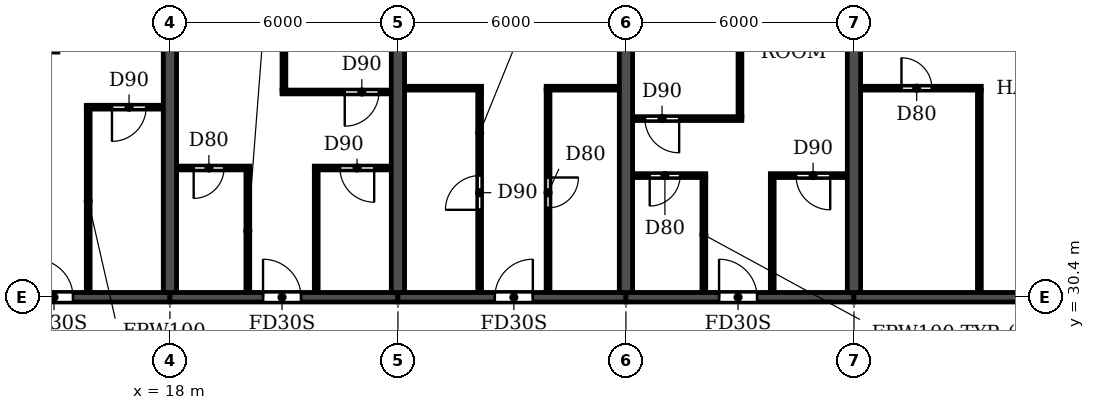
"""IFC4 building model, lengths in metres.
Left out: names, types, materials, properties, quantities, classifications, styles, units other than length and angle.
Written with IfcOpenShell. Run it as: python <this file> out.ifc"""

import sys

from ifc_helpers import new_model, si_unit, direction, frame, frame_2d, origin, place, context, subcontext, project, spatial, rectangle, extrude, element, fill, save


model = new_model("IFC4")
c1 = context("Model", 3, precision=1e-05, world=origin(), true_north=direction((0.0, 1.0)))
c2 = subcontext(c1, "Body", "Model", "MODEL_VIEW")
j1 = project(units=[si_unit("LENGTHUNIT", "METRE"), si_unit("PLANEANGLEUNIT", "RADIAN")], contexts=[c1])
p1 = place(None, origin())
s1 = spatial("IfcSite", under=j1, at=p1, CompositionType="ELEMENT")
p2 = place(p1, origin())
s2 = spatial("IfcBuilding", under=s1, at=p2, CompositionType="ELEMENT")
p3 = place(p2, frame((0.0, 0.0, 76.2)))
s3 = spatial("IfcBuildingStorey", under=s2, at=p3, CompositionType="ELEMENT", Elevation=76.2)
for number, where, z_axis, x_axis in (
    (1, (18.0, 30.525, 0.0), (0.0, 0.0, 1.0), (0.0, 1.0, 0.0)),
    (2, (24.0, 30.525, 0.0), (0.0, 0.0, 1.0), (0.0, 1.0, 0.0)),
    (3, (30.0, 30.525, 0.0), (0.0, 0.0, 1.0), (0.0, 1.0, 0.0)),
    (4, (36.0, 30.525, 0.0), (0.0, 0.0, 1.0), (0.0, 1.0, 0.0)),
):
    element("IfcWall", number, at=place(p3, frame(where, z_axis=z_axis, x_axis=x_axis)), inside=s3, PredefinedType="SHEAR", context=c2, shape_type="SweptSolid", body=[
        extrude(rectangle(XDim=12.875, YDim=0.35, at=frame_2d((6.438, 0.0))), origin(), (0.0, 0.0, 1.0), 3.06),
    ])
p4 = place(p3, frame((12.0, 30.4, 0.0), z_axis=(0.0, 0.0, 1.0), x_axis=(1.0, 0.0, 0.0)))
e5 = element("IfcWall", 5, at=p4, inside=s3, PredefinedType="SHEAR", context=c2, shape_type="SweptSolid", body=[
    extrude(rectangle(XDim=6.0, YDim=0.25, at=frame_2d((3.0, 0.0))), origin(), (0.0, 0.0, 1.0), 2.46),
])
p5 = place(p4, frame((2.45, 0.0, 0.0)))
e6 = element("IfcOpeningElement", 6, at=p5, cuts=e5, PredefinedType="OPENING", context=c2, shape_type="SweptSolid", body=[
    extrude(rectangle(XDim=1.0, YDim=2.1, at=frame_2d((0.5, 1.05))), frame((0.0, 0.135, 0.0), z_axis=(0.0, -1.0, 0.0), x_axis=(1.0, 0.0, 0.0)), (0.0, 0.0, 1.0), 0.27),
])
p6 = place(p3, frame((18.0, 30.4, 0.0), z_axis=(0.0, 0.0, 1.0), x_axis=(1.0, 0.0, 0.0)))
e7 = element("IfcWall", 7, at=p6, inside=s3, PredefinedType="SHEAR", context=c2, shape_type="SweptSolid", body=[
    extrude(rectangle(XDim=6.0, YDim=0.25, at=frame_2d((3.0, 0.0))), origin(), (0.0, 0.0, 1.0), 2.46),
])
p7 = place(p6, frame((2.45, 0.0, 0.0)))
e8 = element("IfcOpeningElement", 8, at=p7, cuts=e7, PredefinedType="OPENING", context=c2, shape_type="SweptSolid", body=[
    extrude(rectangle(XDim=1.0, YDim=2.1, at=frame_2d((0.5, 1.05))), frame((0.0, 0.135, 0.0), z_axis=(0.0, -1.0, 0.0), x_axis=(1.0, 0.0, 0.0)), (0.0, 0.0, 1.0), 0.27),
])
p8 = place(p3, frame((24.0, 30.4, 0.0), z_axis=(0.0, 0.0, 1.0), x_axis=(1.0, 0.0, 0.0)))
e9 = element("IfcWall", 9, at=p8, inside=s3, PredefinedType="SHEAR", context=c2, shape_type="SweptSolid", body=[
    extrude(rectangle(XDim=6.0, YDim=0.25, at=frame_2d((3.0, 0.0))), origin(), (0.0, 0.0, 1.0), 2.46),
])
p9 = place(p8, frame((2.55, 0.0, 0.0)))
e10 = element("IfcOpeningElement", 10, at=p9, cuts=e9, PredefinedType="OPENING", context=c2, shape_type="SweptSolid", body=[
    extrude(rectangle(XDim=1.0, YDim=2.1, at=frame_2d((0.5, 1.05))), frame((0.0, 0.135, 0.0), z_axis=(0.0, -1.0, 0.0), x_axis=(1.0, 0.0, 0.0)), (0.0, 0.0, 1.0), 0.27),
])
p10 = place(p3, frame((30.0, 30.4, 0.0), z_axis=(0.0, 0.0, 1.0), x_axis=(1.0, 0.0, 0.0)))
e11 = element("IfcWall", 11, at=p10, inside=s3, PredefinedType="SHEAR", context=c2, shape_type="SweptSolid", body=[
    extrude(rectangle(XDim=6.0, YDim=0.25, at=frame_2d((3.0, 0.0))), origin(), (0.0, 0.0, 1.0), 2.46),
])
p11 = place(p10, frame((2.45, 0.0, 0.0)))
e12 = element("IfcOpeningElement", 12, at=p11, cuts=e11, PredefinedType="OPENING", context=c2, shape_type="SweptSolid", body=[
    extrude(rectangle(XDim=1.0, YDim=2.1, at=frame_2d((0.5, 1.05))), frame((0.0, 0.135, 0.0), z_axis=(0.0, -1.0, 0.0), x_axis=(1.0, 0.0, 0.0)), (0.0, 0.0, 1.0), 0.27),
])
p12 = place(p3, frame((36.0, 30.4, 0.0), z_axis=(0.0, 0.0, 1.0), x_axis=(1.0, 0.0, 0.0)))
e13 = element("IfcWall", 13, at=p12, inside=s3, PredefinedType="SHEAR", context=c2, shape_type="SweptSolid", body=[
    extrude(rectangle(XDim=6.0, YDim=0.25, at=frame_2d((3.0, 0.0))), origin(), (0.0, 0.0, 1.0), 2.46),
])
p13 = place(p3, frame((30.185, 33.6, 0.0), z_axis=(0.0, 0.0, 1.0), x_axis=(1.0, 0.0, 0.0)))
e14 = element("IfcWall", 14, at=p13, inside=s3, PredefinedType="PARTITIONING", context=c2, shape_type="SweptSolid", body=[
    extrude(rectangle(XDim=1.915, YDim=0.1, at=frame_2d((0.958, 0.0))), origin(), (0.0, 0.0, 1.0), 3.06),
])
p14 = place(p13, frame((0.44, 0.0, 0.0)))
e15 = element("IfcOpeningElement", 15, at=p14, cuts=e14, PredefinedType="OPENING", context=c2, shape_type="SweptSolid", body=[
    extrude(rectangle(XDim=0.8, YDim=2.1, at=frame_2d((0.4, 1.05))), frame((0.0, 0.06, 0.0), z_axis=(0.0, -1.0, 0.0), x_axis=(1.0, 0.0, 0.0)), (0.0, 0.0, 1.0), 0.12),
])
p15 = place(p3, frame((33.8, 33.6, 0.0), z_axis=(0.0, 0.0, 1.0), x_axis=(1.0, 0.0, 0.0)))
e16 = element("IfcWall", 16, at=p15, inside=s3, PredefinedType="PARTITIONING", context=c2, shape_type="SweptSolid", body=[
    extrude(rectangle(XDim=2.015, YDim=0.1, at=frame_2d((1.007, 0.0))), origin(), (0.0, 0.0, 1.0), 3.06),
])
p16 = place(p15, frame((0.675, 0.0, 0.0)))
e17 = element("IfcOpeningElement", 17, at=p16, cuts=e16, PredefinedType="OPENING", context=c2, shape_type="SweptSolid", body=[
    extrude(rectangle(XDim=0.9, YDim=2.1, at=frame_2d((0.45, 1.05))), frame((0.0, 0.06, 0.0), z_axis=(0.0, -1.0, 0.0), x_axis=(1.0, 0.0, 0.0)), (0.0, 0.0, 1.0), 0.12),
])
p17 = place(p3, frame((18.185, 33.8, 0.0), z_axis=(0.0, 0.0, 1.0), x_axis=(1.0, 0.0, 0.0)))
e18 = element("IfcWall", 18, at=p17, inside=s3, PredefinedType="PARTITIONING", context=c2, shape_type="SweptSolid", body=[
    extrude(rectangle(XDim=1.915, YDim=0.1, at=frame_2d((0.958, 0.0))), origin(), (0.0, 0.0, 1.0), 3.06),
])
p18 = place(p17, frame((0.44, 0.0, 0.0)))
e19 = element("IfcOpeningElement", 19, at=p18, cuts=e18, PredefinedType="OPENING", context=c2, shape_type="SweptSolid", body=[
    extrude(rectangle(XDim=0.8, YDim=2.1, at=frame_2d((0.4, 1.05))), frame((0.0, 0.06, 0.0), z_axis=(0.0, -1.0, 0.0), x_axis=(1.0, 0.0, 0.0)), (0.0, 0.0, 1.0), 0.12),
])
p19 = place(p3, frame((21.8, 33.8, 0.0), z_axis=(0.0, 0.0, 1.0), x_axis=(1.0, 0.0, 0.0)))
e20 = element("IfcWall", 20, at=p19, inside=s3, PredefinedType="PARTITIONING", context=c2, shape_type="SweptSolid", body=[
    extrude(rectangle(XDim=2.015, YDim=0.1, at=frame_2d((1.007, 0.0))), origin(), (0.0, 0.0, 1.0), 3.06),
])
p20 = place(p19, frame((0.675, 0.0, 0.0)))
e21 = element("IfcOpeningElement", 21, at=p20, cuts=e20, PredefinedType="OPENING", context=c2, shape_type="SweptSolid", body=[
    extrude(rectangle(XDim=0.9, YDim=2.1, at=frame_2d((0.45, 1.05))), frame((0.0, 0.06, 0.0), z_axis=(0.0, -1.0, 0.0), x_axis=(1.0, 0.0, 0.0)), (0.0, 0.0, 1.0), 0.12),
])
p21 = place(p3, frame((30.185, 35.1, 0.0), z_axis=(0.0, 0.0, 1.0), x_axis=(1.0, 0.0, 0.0)))
e22 = element("IfcWall", 22, at=p21, inside=s3, PredefinedType="PARTITIONING", context=c2, shape_type="SweptSolid", body=[
    extrude(rectangle(XDim=2.865, YDim=0.1, at=frame_2d((1.433, 0.0))), origin(), (0.0, 0.0, 1.0), 3.06),
])
p22 = place(p21, frame((0.315, 0.0, 0.0)))
e23 = element("IfcOpeningElement", 23, at=p22, cuts=e22, PredefinedType="OPENING", context=c2, shape_type="SweptSolid", body=[
    extrude(rectangle(XDim=0.9, YDim=2.1, at=frame_2d((0.45, 1.05))), frame((0.0, 0.06, 0.0), z_axis=(0.0, -1.0, 0.0), x_axis=(1.0, 0.0, 0.0)), (0.0, 0.0, 1.0), 0.12),
])
p23 = place(p3, frame((15.8, 35.4, 0.0), z_axis=(0.0, 0.0, 1.0), x_axis=(1.0, 0.0, 0.0)))
e24 = element("IfcWall", 24, at=p23, inside=s3, PredefinedType="PARTITIONING", context=c2, shape_type="SweptSolid", body=[
    extrude(rectangle(XDim=2.015, YDim=0.1, at=frame_2d((1.007, 0.0))), origin(), (0.0, 0.0, 1.0), 3.06),
])
p24 = place(p23, frame((0.675, 0.0, 0.0)))
e25 = element("IfcOpeningElement", 25, at=p24, cuts=e24, PredefinedType="OPENING", context=c2, shape_type="SweptSolid", body=[
    extrude(rectangle(XDim=0.9, YDim=2.1, at=frame_2d((0.45, 1.05))), frame((0.0, 0.06, 0.0), z_axis=(0.0, -1.0, 0.0), x_axis=(1.0, 0.0, 0.0)), (0.0, 0.0, 1.0), 0.12),
])
p25 = place(p3, frame((20.95, 35.8, 0.0), z_axis=(0.0, 0.0, 1.0), x_axis=(1.0, 0.0, 0.0)))
e26 = element("IfcWall", 26, at=p25, inside=s3, PredefinedType="PARTITIONING", context=c2, shape_type="SweptSolid", body=[
    extrude(rectangle(XDim=2.865, YDim=0.1, at=frame_2d((1.433, 0.0))), origin(), (0.0, 0.0, 1.0), 3.06),
])
p26 = place(p25, frame((1.65, 0.0, 0.0)))
e27 = element("IfcOpeningElement", 27, at=p26, cuts=e26, PredefinedType="OPENING", context=c2, shape_type="SweptSolid", body=[
    extrude(rectangle(XDim=0.9, YDim=2.1, at=frame_2d((0.45, 1.05))), frame((0.0, 0.06, 0.0), z_axis=(0.0, -1.0, 0.0), x_axis=(1.0, 0.0, 0.0)), (0.0, 0.0, 1.0), 0.12),
])
p27 = place(p3, frame((24.185, 35.9, 0.0), z_axis=(0.0, 0.0, 1.0), x_axis=(1.0, 0.0, 0.0)))
e28 = element("IfcWall", 28, at=p27, inside=s3, PredefinedType="PARTITIONING", context=c2, shape_type="SweptSolid", body=[
    extrude(rectangle(XDim=2.015, YDim=0.1, at=frame_2d((1.007, 0.0))), origin(), (0.0, 0.0, 1.0), 3.06),
])
p28 = place(p3, frame((27.9, 35.9, 0.0), z_axis=(0.0, 0.0, 1.0), x_axis=(1.0, 0.0, 0.0)))
e29 = element("IfcWall", 29, at=p28, inside=s3, PredefinedType="PARTITIONING", context=c2, shape_type="SweptSolid", body=[
    extrude(rectangle(XDim=1.915, YDim=0.1, at=frame_2d((0.958, 0.0))), origin(), (0.0, 0.0, 1.0), 3.06),
])
p29 = place(p3, frame((36.185, 35.9, 0.0), z_axis=(0.0, 0.0, 1.0), x_axis=(1.0, 0.0, 0.0)))
e30 = element("IfcWall", 30, at=p29, inside=s3, PredefinedType="PARTITIONING", context=c2, shape_type="SweptSolid", body=[
    extrude(rectangle(XDim=3.165, YDim=0.1, at=frame_2d((1.583, 0.0))), origin(), (0.0, 0.0, 1.0), 3.06),
])
p30 = place(p29, frame((1.065, 0.0, 0.0)))
e31 = element("IfcOpeningElement", 31, at=p30, cuts=e30, PredefinedType="OPENING", context=c2, shape_type="SweptSolid", body=[
    extrude(rectangle(XDim=0.8, YDim=2.1, at=frame_2d((0.4, 1.05))), frame((0.0, 0.06, 0.0), z_axis=(0.0, -1.0, 0.0), x_axis=(1.0, 0.0, 0.0)), (0.0, 0.0, 1.0), 0.12),
])
p31 = place(p3, frame((12.185, 36.9, 0.0), z_axis=(0.0, 0.0, 1.0), x_axis=(1.0, 0.0, 0.0)))
e32 = element("IfcWall", 32, at=p31, inside=s3, PredefinedType="PARTITIONING", context=c2, shape_type="SweptSolid", body=[
    extrude(rectangle(XDim=2.865, YDim=0.1, at=frame_2d((1.433, 0.0))), origin(), (0.0, 0.0, 1.0), 3.06),
])
p32 = place(p31, frame((1.415, 0.0, 0.0)))
e33 = element("IfcOpeningElement", 33, at=p32, cuts=e32, PredefinedType="OPENING", context=c2, shape_type="SweptSolid", body=[
    extrude(rectangle(XDim=0.9, YDim=2.1, at=frame_2d((0.45, 1.05))), frame((0.0, 0.06, 0.0), z_axis=(0.0, -1.0, 0.0), x_axis=(1.0, 0.0, 0.0)), (0.0, 0.0, 1.0), 0.12),
])
p33 = place(p3, frame((15.85, 30.535, 0.0), z_axis=(0.0, 0.0, 1.0), x_axis=(0.0, 1.0, 0.0)))
e34 = element("IfcWall", 34, at=p33, inside=s3, PredefinedType="PARTITIONING", context=c2, shape_type="SweptSolid", body=[
    extrude(rectangle(XDim=4.815, YDim=0.1, at=frame_2d((2.408, 0.0))), origin(), (0.0, 0.0, 1.0), 3.06),
])
p34 = place(p3, frame((20.05, 30.535, 0.0), z_axis=(0.0, 0.0, 1.0), x_axis=(0.0, 1.0, 0.0)))
e35 = element("IfcWall", 35, at=p34, inside=s3, PredefinedType="PARTITIONING", context=c2, shape_type="SweptSolid", body=[
    extrude(rectangle(XDim=3.215, YDim=0.1, at=frame_2d((1.607, 0.0))), origin(), (0.0, 0.0, 1.0), 3.06),
])
p35 = place(p3, frame((21.0, 35.85, 0.0), z_axis=(0.0, 0.0, 1.0), x_axis=(0.0, 1.0, 0.0)))
e36 = element("IfcWall", 36, at=p35, inside=s3, PredefinedType="PARTITIONING", context=c2, shape_type="SweptSolid", body=[
    extrude(rectangle(XDim=7.69, YDim=0.1, at=frame_2d((3.845, 0.0))), origin(), (0.0, 0.0, 1.0), 3.06),
])
p36 = place(p3, frame((21.85, 30.535, 0.0), z_axis=(0.0, 0.0, 1.0), x_axis=(0.0, 1.0, 0.0)))
e37 = element("IfcWall", 37, at=p36, inside=s3, PredefinedType="PARTITIONING", context=c2, shape_type="SweptSolid", body=[
    extrude(rectangle(XDim=3.215, YDim=0.1, at=frame_2d((1.607, 0.0))), origin(), (0.0, 0.0, 1.0), 3.06),
])
p37 = place(p3, frame((26.15, 30.535, 0.0), z_axis=(0.0, 0.0, 1.0), x_axis=(0.0, 1.0, 0.0)))
e38 = element("IfcWall", 38, at=p37, inside=s3, PredefinedType="PARTITIONING", context=c2, shape_type="SweptSolid", body=[
    extrude(rectangle(XDim=5.315, YDim=0.1, at=frame_2d((2.658, 0.0))), origin(), (0.0, 0.0, 1.0), 3.06),
])
p38 = place(p37, frame((2.165, 0.0, 0.0)))
e39 = element("IfcOpeningElement", 39, at=p38, cuts=e38, PredefinedType="OPENING", context=c2, shape_type="SweptSolid", body=[
    extrude(rectangle(XDim=0.9, YDim=2.1, at=frame_2d((0.45, 1.05))), frame((0.0, 0.06, 0.0), z_axis=(0.0, -1.0, 0.0), x_axis=(1.0, 0.0, 0.0)), (0.0, 0.0, 1.0), 0.12),
])
p39 = place(p3, frame((27.95, 30.535, 0.0), z_axis=(0.0, 0.0, 1.0), x_axis=(0.0, 1.0, 0.0)))
e40 = element("IfcWall", 40, at=p39, inside=s3, PredefinedType="PARTITIONING", context=c2, shape_type="SweptSolid", body=[
    extrude(rectangle(XDim=5.315, YDim=0.1, at=frame_2d((2.658, 0.0))), origin(), (0.0, 0.0, 1.0), 3.06),
])
p40 = place(p39, frame((2.215, 0.0, 0.0)))
e41 = element("IfcOpeningElement", 41, at=p40, cuts=e40, PredefinedType="OPENING", context=c2, shape_type="SweptSolid", body=[
    extrude(rectangle(XDim=0.8, YDim=2.1, at=frame_2d((0.4, 1.05))), frame((0.0, 0.06, 0.0), z_axis=(0.0, -1.0, 0.0), x_axis=(1.0, 0.0, 0.0)), (0.0, 0.0, 1.0), 0.12),
])
p41 = place(p3, frame((32.05, 30.535, 0.0), z_axis=(0.0, 0.0, 1.0), x_axis=(0.0, 1.0, 0.0)))
e42 = element("IfcWall", 42, at=p41, inside=s3, PredefinedType="PARTITIONING", context=c2, shape_type="SweptSolid", body=[
    extrude(rectangle(XDim=3.015, YDim=0.1, at=frame_2d((1.508, 0.0))), origin(), (0.0, 0.0, 1.0), 3.06),
])
p42 = place(p3, frame((33.0, 35.15, 0.0), z_axis=(0.0, 0.0, 1.0), x_axis=(0.0, 1.0, 0.0)))
e43 = element("IfcWall", 43, at=p42, inside=s3, PredefinedType="PARTITIONING", context=c2, shape_type="SweptSolid", body=[
    extrude(rectangle(XDim=8.39, YDim=0.1, at=frame_2d((4.195, 0.0))), origin(), (0.0, 0.0, 1.0), 3.06),
])
p43 = place(p3, frame((33.85, 30.535, 0.0), z_axis=(0.0, 0.0, 1.0), x_axis=(0.0, 1.0, 0.0)))
e44 = element("IfcWall", 44, at=p43, inside=s3, PredefinedType="PARTITIONING", context=c2, shape_type="SweptSolid", body=[
    extrude(rectangle(XDim=3.015, YDim=0.1, at=frame_2d((1.508, 0.0))), origin(), (0.0, 0.0, 1.0), 3.06),
])
p44 = place(p3, frame((39.3, 30.535, 0.0), z_axis=(0.0, 0.0, 1.0), x_axis=(0.0, 1.0, 0.0)))
e45 = element("IfcWall", 45, at=p44, inside=s3, PredefinedType="PARTITIONING", context=c2, shape_type="SweptSolid", body=[
    extrude(rectangle(XDim=5.315, YDim=0.1, at=frame_2d((2.658, 0.0))), origin(), (0.0, 0.0, 1.0), 3.06),
])
p45 = place(p5, origin())
e46 = element("IfcDoor", 46, at=p45, inside=s3, OperationType="SINGLE_SWING_LEFT", PredefinedType="DOOR", context=c2, shape_type="SweptSolid", body=[
    extrude(rectangle(XDim=1.0, YDim=2.1, at=frame_2d((0.5, 1.05))), frame((0.0, 0.025, 0.0), z_axis=(0.0, -1.0, 0.0), x_axis=(1.0, 0.0, 0.0)), (0.0, 0.0, 1.0), 0.05),
])
fill(e6, e46)
p46 = place(p24, frame((0.9, 0.0, 0.0), z_axis=(0.0, 0.0, 1.0), x_axis=(-1.0, 0.0, 0.0)))
e47 = element("IfcDoor", 47, at=p46, inside=s3, OperationType="SINGLE_SWING_RIGHT", PredefinedType="DOOR", context=c2, shape_type="SweptSolid", body=[
    extrude(rectangle(XDim=0.9, YDim=2.1, at=frame_2d((0.45, 1.05))), frame((0.0, 0.025, 0.0), z_axis=(0.0, -1.0, 0.0), x_axis=(1.0, 0.0, 0.0)), (0.0, 0.0, 1.0), 0.05),
])
fill(e25, e47)
p47 = place(p18, frame((0.8, 0.0, 0.0), z_axis=(0.0, 0.0, 1.0), x_axis=(-1.0, 0.0, 0.0)))
e48 = element("IfcDoor", 48, at=p47, inside=s3, OperationType="SINGLE_SWING_RIGHT", PredefinedType="DOOR", context=c2, shape_type="SweptSolid", body=[
    extrude(rectangle(XDim=0.8, YDim=2.1, at=frame_2d((0.4, 1.05))), frame((0.0, 0.025, 0.0), z_axis=(0.0, -1.0, 0.0), x_axis=(1.0, 0.0, 0.0)), (0.0, 0.0, 1.0), 0.05),
])
fill(e19, e48)
p48 = place(p7, origin())
e49 = element("IfcDoor", 49, at=p48, inside=s3, OperationType="SINGLE_SWING_LEFT", PredefinedType="DOOR", context=c2, shape_type="SweptSolid", body=[
    extrude(rectangle(XDim=1.0, YDim=2.1, at=frame_2d((0.5, 1.05))), frame((0.0, 0.025, 0.0), z_axis=(0.0, -1.0, 0.0), x_axis=(1.0, 0.0, 0.0)), (0.0, 0.0, 1.0), 0.05),
])
fill(e8, e49)
p49 = place(p20, frame((0.9, 0.0, 0.0), z_axis=(0.0, 0.0, 1.0), x_axis=(-1.0, 0.0, 0.0)))
e50 = element("IfcDoor", 50, at=p49, inside=s3, OperationType="SINGLE_SWING_LEFT", PredefinedType="DOOR", context=c2, shape_type="SweptSolid", body=[
    extrude(rectangle(XDim=0.9, YDim=2.1, at=frame_2d((0.45, 1.05))), frame((0.0, 0.025, 0.0), z_axis=(0.0, -1.0, 0.0), x_axis=(1.0, 0.0, 0.0)), (0.0, 0.0, 1.0), 0.05),
])
fill(e21, e50)
p50 = place(p26, frame((0.9, 0.0, 0.0), z_axis=(0.0, 0.0, 1.0), x_axis=(-1.0, 0.0, 0.0)))
e51 = element("IfcDoor", 51, at=p50, inside=s3, OperationType="SINGLE_SWING_RIGHT", PredefinedType="DOOR", context=c2, shape_type="SweptSolid", body=[
    extrude(rectangle(XDim=0.9, YDim=2.1, at=frame_2d((0.45, 1.05))), frame((0.0, 0.025, 0.0), z_axis=(0.0, -1.0, 0.0), x_axis=(1.0, 0.0, 0.0)), (0.0, 0.0, 1.0), 0.05),
])
fill(e27, e51)
p51 = place(p38, origin())
e52 = element("IfcDoor", 52, at=p51, inside=s3, OperationType="SINGLE_SWING_LEFT", PredefinedType="DOOR", context=c2, shape_type="SweptSolid", body=[
    extrude(rectangle(XDim=0.9, YDim=2.1, at=frame_2d((0.45, 1.05))), frame((0.0, 0.025, 0.0), z_axis=(0.0, -1.0, 0.0), x_axis=(1.0, 0.0, 0.0)), (0.0, 0.0, 1.0), 0.05),
])
fill(e39, e52)
p52 = place(p9, origin())
e53 = element("IfcDoor", 53, at=p52, inside=s3, OperationType="SINGLE_SWING_RIGHT", PredefinedType="DOOR", context=c2, shape_type="SweptSolid", body=[
    extrude(rectangle(XDim=1.0, YDim=2.1, at=frame_2d((0.5, 1.05))), frame((0.0, 0.025, 0.0), z_axis=(0.0, -1.0, 0.0), x_axis=(1.0, 0.0, 0.0)), (0.0, 0.0, 1.0), 0.05),
])
fill(e10, e53)
p53 = place(p40, frame((0.8, 0.0, 0.0), z_axis=(0.0, 0.0, 1.0), x_axis=(-1.0, 0.0, 0.0)))
e54 = element("IfcDoor", 54, at=p53, inside=s3, OperationType="SINGLE_SWING_LEFT", PredefinedType="DOOR", context=c2, shape_type="SweptSolid", body=[
    extrude(rectangle(XDim=0.8, YDim=2.1, at=frame_2d((0.4, 1.05))), frame((0.0, 0.025, 0.0), z_axis=(0.0, -1.0, 0.0), x_axis=(1.0, 0.0, 0.0)), (0.0, 0.0, 1.0), 0.05),
])
fill(e41, e54)
p54 = place(p22, frame((0.9, 0.0, 0.0), z_axis=(0.0, 0.0, 1.0), x_axis=(-1.0, 0.0, 0.0)))
e55 = element("IfcDoor", 55, at=p54, inside=s3, OperationType="SINGLE_SWING_LEFT", PredefinedType="DOOR", context=c2, shape_type="SweptSolid", body=[
    extrude(rectangle(XDim=0.9, YDim=2.1, at=frame_2d((0.45, 1.05))), frame((0.0, 0.025, 0.0), z_axis=(0.0, -1.0, 0.0), x_axis=(1.0, 0.0, 0.0)), (0.0, 0.0, 1.0), 0.05),
])
fill(e23, e55)
p55 = place(p14, frame((0.8, 0.0, 0.0), z_axis=(0.0, 0.0, 1.0), x_axis=(-1.0, 0.0, 0.0)))
e56 = element("IfcDoor", 56, at=p55, inside=s3, OperationType="SINGLE_SWING_RIGHT", PredefinedType="DOOR", context=c2, shape_type="SweptSolid", body=[
    extrude(rectangle(XDim=0.8, YDim=2.1, at=frame_2d((0.4, 1.05))), frame((0.0, 0.025, 0.0), z_axis=(0.0, -1.0, 0.0), x_axis=(1.0, 0.0, 0.0)), (0.0, 0.0, 1.0), 0.05),
])
fill(e15, e56)
p56 = place(p11, origin())
e57 = element("IfcDoor", 57, at=p56, inside=s3, OperationType="SINGLE_SWING_LEFT", PredefinedType="DOOR", context=c2, shape_type="SweptSolid", body=[
    extrude(rectangle(XDim=1.0, YDim=2.1, at=frame_2d((0.5, 1.05))), frame((0.0, 0.025, 0.0), z_axis=(0.0, -1.0, 0.0), x_axis=(1.0, 0.0, 0.0)), (0.0, 0.0, 1.0), 0.05),
])
fill(e12, e57)
p57 = place(p16, frame((0.9, 0.0, 0.0), z_axis=(0.0, 0.0, 1.0), x_axis=(-1.0, 0.0, 0.0)))
e58 = element("IfcDoor", 58, at=p57, inside=s3, OperationType="SINGLE_SWING_LEFT", PredefinedType="DOOR", context=c2, shape_type="SweptSolid", body=[
    extrude(rectangle(XDim=0.9, YDim=2.1, at=frame_2d((0.45, 1.05))), frame((0.0, 0.025, 0.0), z_axis=(0.0, -1.0, 0.0), x_axis=(1.0, 0.0, 0.0)), (0.0, 0.0, 1.0), 0.05),
])
fill(e17, e58)
p58 = place(p30, origin())
e59 = element("IfcDoor", 59, at=p58, inside=s3, OperationType="SINGLE_SWING_LEFT", PredefinedType="DOOR", context=c2, shape_type="SweptSolid", body=[
    extrude(rectangle(XDim=0.8, YDim=2.1, at=frame_2d((0.4, 1.05))), frame((0.0, 0.025, 0.0), z_axis=(0.0, -1.0, 0.0), x_axis=(1.0, 0.0, 0.0)), (0.0, 0.0, 1.0), 0.05),
])
fill(e31, e59)
save(model, sys.argv[1])
